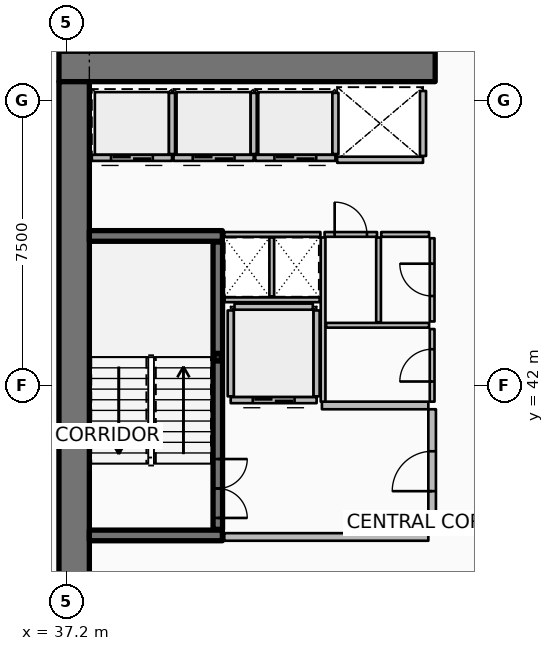
"""IFC4 building model, lengths in metres.
Left out: names, types, materials, properties, quantities, classifications, styles, units other than length and angle.
Written with IfcOpenShell. Run it as: python <this file> out.ifc"""

import sys

from ifc_helpers import new_model, si_unit, direction, frame, frame_2d, origin, origin_2d, place, context, subcontext, project, spatial, rectangle, hollow_rectangle, extrude, element, fill, save


model = new_model("IFC4")
c1 = context("Model", 3, precision=1e-05, world=origin(), true_north=direction((0.0, 1.0)))
c2 = subcontext(c1, "Body", "Model", "MODEL_VIEW")
j1 = project(units=[si_unit("LENGTHUNIT", "METRE"), si_unit("PLANEANGLEUNIT", "RADIAN")], contexts=[c1])
p1 = place(None, origin())
s1 = spatial("IfcSite", under=j1, at=p1, CompositionType="ELEMENT")
p2 = place(p1, origin())
s2 = spatial("IfcBuilding", under=s1, at=p2, CompositionType="ELEMENT")
p3 = place(p2, frame((0.0, 0.0, 146.55)))
s3 = spatial("IfcBuildingStorey", under=s2, at=p3, CompositionType="ELEMENT", Elevation=146.55)
p4 = place(p3, frame((37.0, 50.4, 0.0), z_axis=(0.0, 0.0, 1.0), x_axis=(1.0, 0.0, 0.0)))
e1 = element("IfcWall", 1, at=p4, inside=s3, PredefinedType="SHEAR", context=c2, shape_type="SweptSolid", body=[
    extrude(rectangle(XDim=9.9, YDim=0.8, at=frame_2d((4.95, 0.0))), origin(), (0.0, 0.0, 1.0), 3.75),
])
p5 = place(p3, frame((37.4, 34.0, 0.0), z_axis=(0.0, 0.0, 1.0), x_axis=(0.0, 1.0, 0.0)))
e2 = element("IfcWall", 2, at=p5, inside=s3, PredefinedType="SHEAR", context=c2, shape_type="SweptSolid", body=[
    extrude(rectangle(XDim=16.0, YDim=0.8, at=frame_2d((8.0, 0.0))), origin(), (0.0, 0.0, 1.0), 3.75),
])
for number, where, z_axis, x_axis in (
    (3, (37.8, 38.06, 0.0), (0.0, 0.0, 1.0), (1.0, 0.0, 0.0)),
    (4, (37.8, 45.94, 0.0), (0.0, 0.0, 1.0), (1.0, 0.0, 0.0)),
):
    element("IfcWall", number, at=place(p3, frame(where, z_axis=z_axis, x_axis=x_axis)), inside=s3, PredefinedType="SHEAR", context=c2, shape_type="SweptSolid", body=[
        extrude(rectangle(XDim=3.5, YDim=0.28, at=frame_2d((1.75, 0.0))), origin(), (0.0, 0.0, 1.0), 3.75),
    ])
p6 = place(p3, frame((41.18, 42.75, 0.0), z_axis=(0.0, 0.0, 1.0), x_axis=(1.0, 0.0, 0.0)))
e5 = element("IfcColumn", 5, at=p6, inside=s3, PredefinedType="COLUMN", context=c2, shape_type="SweptSolid", body=[
    extrude(hollow_rectangle(XDim=0.2, YDim=0.2, WallThickness=0.01, InnerFilletRadius=0.01, OuterFilletRadius=0.02, at=origin_2d()), origin(), (0.0, 0.0, 1.0), 1.67),
])
p7 = place(p3, frame((41.18, 38.22, 0.0), z_axis=(0.0, 0.0, 1.0), x_axis=(0.0, 1.0, 0.0)))
e6 = element("IfcWall", 6, at=p7, inside=s3, PredefinedType="SOLIDWALL", context=c2, shape_type="SweptSolid", body=[
    extrude(rectangle(XDim=7.56, YDim=0.25, at=frame_2d((3.78, 0.0))), origin(), (0.0, 0.0, 1.0), 3.5),
])
p8 = place(p7, frame((0.3, 0.0, 0.0)))
e7 = element("IfcOpeningElement", 7, at=p8, cuts=e6, PredefinedType="OPENING", context=c2, shape_type="SweptSolid", body=[
    extrude(rectangle(XDim=1.55, YDim=2.15, at=frame_2d((0.775, 1.075))), frame((0.0, 0.135, 0.0), z_axis=(0.0, -1.0, 0.0), x_axis=(1.0, 0.0, 0.0)), (0.0, 0.0, 1.0), 0.27),
])
p9 = place(p3, frame((39.975, 47.995, 0.0), z_axis=(0.0, 0.0, 1.0), x_axis=(-1.0, 0.0, 0.0)))
e8 = element("IfcWall", 8, at=p9, inside=s3, PredefinedType="PARTITIONING", context=c2, shape_type="SweptSolid", body=[
    extrude(rectangle(XDim=2.11, YDim=0.16, at=frame_2d((1.055, 0.0))), origin(), (0.0, 0.0, 1.0), 3.5),
])
p10 = place(p9, frame((0.505, 0.0, 0.0)))
e9 = element("IfcOpeningElement", 9, at=p10, cuts=e8, PredefinedType="OPENING", context=c2, shape_type="SweptSolid", body=[
    extrude(rectangle(XDim=1.1, YDim=2.1, at=frame_2d((0.55, 1.05))), frame((0.0, 0.09, 0.0), z_axis=(0.0, -1.0, 0.0), x_axis=(1.0, 0.0, 0.0)), (0.0, 0.0, 1.0), 0.18),
])
p11 = place(p3, frame((39.975, 48.095, 0.0), z_axis=(0.0, 0.0, 1.0), x_axis=(0.0, 1.0, 0.0)))
e10 = element("IfcWall", 10, at=p11, inside=s3, PredefinedType="PARTITIONING", context=c2, shape_type="SweptSolid", body=[
    extrude(rectangle(XDim=1.61, YDim=0.16, at=frame_2d((0.805, 0.0))), origin(), (0.0, 0.0, 1.0), 3.5),
])
p12 = place(p3, frame((42.125, 47.995, 0.0), z_axis=(0.0, 0.0, 1.0), x_axis=(-1.0, 0.0, 0.0)))
e11 = element("IfcWall", 11, at=p12, inside=s3, PredefinedType="PARTITIONING", context=c2, shape_type="SweptSolid", body=[
    extrude(rectangle(XDim=2.11, YDim=0.16, at=frame_2d((1.055, 0.0))), origin(), (0.0, 0.0, 1.0), 3.5),
])
p13 = place(p12, frame((0.505, 0.0, 0.0)))
e12 = element("IfcOpeningElement", 12, at=p13, cuts=e11, PredefinedType="OPENING", context=c2, shape_type="SweptSolid", body=[
    extrude(rectangle(XDim=1.1, YDim=2.1, at=frame_2d((0.55, 1.05))), frame((0.0, 0.09, 0.0), z_axis=(0.0, -1.0, 0.0), x_axis=(1.0, 0.0, 0.0)), (0.0, 0.0, 1.0), 0.18),
])
p14 = place(p3, frame((42.125, 48.095, 0.0), z_axis=(0.0, 0.0, 1.0), x_axis=(0.0, 1.0, 0.0)))
e13 = element("IfcWall", 13, at=p14, inside=s3, PredefinedType="PARTITIONING", context=c2, shape_type="SweptSolid", body=[
    extrude(rectangle(XDim=1.61, YDim=0.16, at=frame_2d((0.805, 0.0))), origin(), (0.0, 0.0, 1.0), 3.5),
])
p15 = place(p3, frame((44.275, 47.995, 0.0), z_axis=(0.0, 0.0, 1.0), x_axis=(-1.0, 0.0, 0.0)))
e14 = element("IfcWall", 14, at=p15, inside=s3, PredefinedType="PARTITIONING", context=c2, shape_type="SweptSolid", body=[
    extrude(rectangle(XDim=2.11, YDim=0.16, at=frame_2d((1.055, 0.0))), origin(), (0.0, 0.0, 1.0), 3.5),
])
p16 = place(p15, frame((0.505, 0.0, 0.0)))
e15 = element("IfcOpeningElement", 15, at=p16, cuts=e14, PredefinedType="OPENING", context=c2, shape_type="SweptSolid", body=[
    extrude(rectangle(XDim=1.1, YDim=2.1, at=frame_2d((0.55, 1.05))), frame((0.0, 0.09, 0.0), z_axis=(0.0, -1.0, 0.0), x_axis=(1.0, 0.0, 0.0)), (0.0, 0.0, 1.0), 0.18),
])
p17 = place(p3, frame((44.275, 48.095, 0.0), z_axis=(0.0, 0.0, 1.0), x_axis=(0.0, 1.0, 0.0)))
e16 = element("IfcWall", 16, at=p17, inside=s3, PredefinedType="PARTITIONING", context=c2, shape_type="SweptSolid", body=[
    extrude(rectangle(XDim=1.61, YDim=0.16, at=frame_2d((0.805, 0.0))), origin(), (0.0, 0.0, 1.0), 3.5),
])
p18 = place(p3, frame((46.58, 47.945, 0.0), z_axis=(0.0, 0.0, 1.0), x_axis=(-1.0, 0.0, 0.0)))
e17 = element("IfcWall", 17, at=p18, inside=s3, PredefinedType="PARTITIONING", context=c2, shape_type="SweptSolid", body=[
    extrude(rectangle(XDim=2.26, YDim=0.16, at=frame_2d((1.13, 0.0))), origin(), (0.0, 0.0, 1.0), 3.5),
])
p19 = place(p3, frame((46.58, 48.045, 0.0), z_axis=(0.0, 0.0, 1.0), x_axis=(0.0, 1.0, 0.0)))
e18 = element("IfcWall", 18, at=p19, inside=s3, PredefinedType="PARTITIONING", context=c2, shape_type="SweptSolid", body=[
    extrude(rectangle(XDim=1.71, YDim=0.16, at=frame_2d((0.855, 0.0))), origin(), (0.0, 0.0, 1.0), 3.5),
])
p20 = place(p3, frame((43.78, 41.62, 0.0), z_axis=(0.0, 0.0, 1.0), x_axis=(-1.0, 0.0, 0.0)))
e19 = element("IfcWall", 19, at=p20, inside=s3, PredefinedType="PARTITIONING", context=c2, shape_type="SweptSolid", body=[
    extrude(rectangle(XDim=2.26, YDim=0.16, at=frame_2d((1.13, 0.0))), origin(), (0.0, 0.0, 1.0), 3.5),
])
p21 = place(p20, frame((0.58, 0.0, 0.0)))
e20 = element("IfcOpeningElement", 20, at=p21, cuts=e19, PredefinedType="OPENING", context=c2, shape_type="SweptSolid", body=[
    extrude(rectangle(XDim=1.1, YDim=2.1, at=frame_2d((0.55, 1.05))), frame((0.0, 0.09, 0.0), z_axis=(0.0, -1.0, 0.0), x_axis=(1.0, 0.0, 0.0)), (0.0, 0.0, 1.0), 0.18),
])
for number, where, z_axis, x_axis in (
    (21, (43.78, 41.72, 0.0), (0.0, 0.0, 1.0), (0.0, 1.0, 0.0)),
    (22, (41.52, 41.72, 0.0), (0.0, 0.0, 1.0), (0.0, 1.0, 0.0)),
):
    element("IfcWall", number, at=place(p3, frame(where, z_axis=z_axis, x_axis=x_axis)), inside=s3, PredefinedType="PARTITIONING", context=c2, shape_type="SweptSolid", body=[
        extrude(rectangle(XDim=2.26, YDim=0.16, at=frame_2d((1.13, 0.0))), origin(), (0.0, 0.0, 1.0), 3.5),
    ])
p22 = place(p3, frame((41.62, 44.08, 0.0), z_axis=(0.0, 0.0, 1.0), x_axis=(1.0, 0.0, 0.0)))
e23 = element("IfcWall", 23, at=p22, inside=s3, PredefinedType="PARTITIONING", context=c2, shape_type="SweptSolid", body=[
    extrude(rectangle(XDim=2.06, YDim=0.16, at=frame_2d((1.03, 0.0))), origin(), (0.0, 0.0, 1.0), 3.5),
])
p23 = place(p3, frame((41.35, 38.02, 0.0), z_axis=(0.0, 0.0, 1.0), x_axis=(1.0, 0.0, 0.0)))
e24 = element("IfcWall", 24, at=p23, inside=s3, PredefinedType="PARTITIONING", context=c2, shape_type="SweptSolid", body=[
    extrude(rectangle(XDim=5.37, YDim=0.2, at=frame_2d((2.685, 0.0))), origin(), (0.0, 0.0, 1.0), 3.5),
])
p24 = place(p3, frame((43.92, 41.48, 0.0), z_axis=(0.0, 0.0, 1.0), x_axis=(1.0, 0.0, 0.0)))
e25 = element("IfcWall", 25, at=p24, inside=s3, PredefinedType="PARTITIONING", context=c2, shape_type="SweptSolid", body=[
    extrude(rectangle(XDim=2.8, YDim=0.2, at=frame_2d((1.4, 0.0))), origin(), (0.0, 0.0, 1.0), 3.5),
])
p25 = place(p3, frame((46.82, 38.12, 0.0), z_axis=(0.0, 0.0, 1.0), x_axis=(0.0, 1.0, 0.0)))
e26 = element("IfcWall", 26, at=p25, inside=s3, PredefinedType="PARTITIONING", context=c2, shape_type="SweptSolid", body=[
    extrude(rectangle(XDim=3.26, YDim=0.2, at=frame_2d((1.63, 0.0))), origin(), (0.0, 0.0, 1.0), 3.5),
])
p26 = place(p25, frame((1.105, 0.0, 0.0)))
e27 = element("IfcOpeningElement", 27, at=p26, cuts=e26, PredefinedType="OPENING", context=c2, shape_type="SweptSolid", body=[
    extrude(rectangle(XDim=1.05, YDim=2.1, at=frame_2d((0.525, 1.05))), frame((0.0, 0.11, 0.0), z_axis=(0.0, -1.0, 0.0), x_axis=(1.0, 0.0, 0.0)), (0.0, 0.0, 1.0), 0.22),
])
p27 = place(p3, frame((41.36, 44.26, 0.0), z_axis=(0.0, 0.0, 1.0), x_axis=(1.0, 0.0, 0.0)))
e28 = element("IfcWall", 28, at=p27, inside=s3, PredefinedType="PARTITIONING", context=c2, shape_type="SweptSolid", body=[
    extrude(rectangle(XDim=2.5, YDim=0.125, at=frame_2d((1.25, 0.0))), origin(), (0.0, 0.0, 1.0), 2.94),
])
p28 = place(p3, frame((42.6, 44.35, 0.0), z_axis=(0.0, 0.0, 1.0), x_axis=(0.0, 1.0, 0.0)))
e29 = element("IfcWall", 29, at=p28, inside=s3, PredefinedType="PARTITIONING", context=c2, shape_type="SweptSolid", body=[
    extrude(rectangle(XDim=1.55, YDim=0.125, at=frame_2d((0.775, 0.0))), origin(), (0.0, 0.0, 1.0), 2.94),
])
p29 = place(p3, frame((43.95, 41.58, 0.0), z_axis=(0.0, 0.0, 1.0), x_axis=(0.0, 1.0, 0.0)))
e30 = element("IfcWall", 30, at=p29, inside=s3, PredefinedType="PARTITIONING", context=c2, shape_type="SweptSolid", body=[
    extrude(rectangle(XDim=4.32, YDim=0.125, at=frame_2d((2.16, 0.0))), origin(), (0.0, 0.0, 1.0), 2.94),
])
p30 = place(p3, frame((44.03, 43.59, 0.0), z_axis=(0.0, 0.0, 1.0), x_axis=(1.0, 0.0, 0.0)))
e31 = element("IfcWall", 31, at=p30, inside=s3, PredefinedType="PARTITIONING", context=c2, shape_type="SweptSolid", body=[
    extrude(rectangle(XDim=2.71, YDim=0.125, at=frame_2d((1.355, 0.0))), origin(), (0.0, 0.0, 1.0), 2.94),
])
p31 = place(p3, frame((45.41, 43.67, 0.0), z_axis=(0.0, 0.0, 1.0), x_axis=(0.0, 1.0, 0.0)))
e32 = element("IfcWall", 32, at=p31, inside=s3, PredefinedType="PARTITIONING", context=c2, shape_type="SweptSolid", body=[
    extrude(rectangle(XDim=2.23, YDim=0.125, at=frame_2d((1.115, 0.0))), origin(), (0.0, 0.0, 1.0), 2.94),
])
p32 = place(p3, frame((46.82, 41.58, 0.0), z_axis=(0.0, 0.0, 1.0), x_axis=(0.0, 1.0, 0.0)))
e33 = element("IfcWall", 33, at=p32, inside=s3, PredefinedType="PARTITIONING", context=c2, shape_type="SweptSolid", body=[
    extrude(rectangle(XDim=1.91, YDim=0.125, at=frame_2d((0.955, 0.0))), origin(), (0.0, 0.0, 1.0), 2.94),
])
p33 = place(p32, frame((0.53, 0.0, 0.0)))
e34 = element("IfcOpeningElement", 34, at=p33, cuts=e33, PredefinedType="OPENING", context=c2, shape_type="SweptSolid", body=[
    extrude(rectangle(XDim=0.85, YDim=2.06, at=frame_2d((0.425, 1.03))), frame((0.0, 0.073, 0.0), z_axis=(0.0, -1.0, 0.0), x_axis=(1.0, 0.0, 0.0)), (0.0, 0.0, 1.0), 0.145),
])
p34 = place(p3, frame((46.82, 43.69, 0.0), z_axis=(0.0, 0.0, 1.0), x_axis=(0.0, 1.0, 0.0)))
e35 = element("IfcWall", 35, at=p34, inside=s3, PredefinedType="PARTITIONING", context=c2, shape_type="SweptSolid", body=[
    extrude(rectangle(XDim=2.19, YDim=0.125, at=frame_2d((1.095, 0.0))), origin(), (0.0, 0.0, 1.0), 2.94),
])
p35 = place(p34, frame((0.67, 0.0, 0.0)))
e36 = element("IfcOpeningElement", 36, at=p35, cuts=e35, PredefinedType="OPENING", context=c2, shape_type="SweptSolid", body=[
    extrude(rectangle(XDim=0.85, YDim=2.06, at=frame_2d((0.425, 1.03))), frame((0.0, 0.073, 0.0), z_axis=(0.0, -1.0, 0.0), x_axis=(1.0, 0.0, 0.0)), (0.0, 0.0, 1.0), 0.145),
])
p36 = place(p3, frame((41.35, 45.98, 0.0), z_axis=(0.0, 0.0, 1.0), x_axis=(1.0, 0.0, 0.0)))
e37 = element("IfcWall", 37, at=p36, inside=s3, PredefinedType="PARTITIONING", context=c2, shape_type="SweptSolid", body=[
    extrude(rectangle(XDim=2.53, YDim=0.125, at=frame_2d((1.265, 0.0))), origin(), (0.0, 0.0, 1.0), 2.94),
])
p37 = place(p3, frame((43.99, 45.98, 0.0), z_axis=(0.0, 0.0, 1.0), x_axis=(1.0, 0.0, 0.0)))
e38 = element("IfcWall", 38, at=p37, inside=s3, PredefinedType="PARTITIONING", context=c2, shape_type="SweptSolid", body=[
    extrude(rectangle(XDim=1.38, YDim=0.125, at=frame_2d((0.69, 0.0))), origin(), (0.0, 0.0, 1.0), 2.94),
])
p38 = place(p37, frame((0.265, 0.0, 0.0)))
e39 = element("IfcOpeningElement", 39, at=p38, cuts=e38, PredefinedType="OPENING", context=c2, shape_type="SweptSolid", body=[
    extrude(rectangle(XDim=0.85, YDim=2.06, at=frame_2d((0.425, 1.03))), frame((0.0, 0.073, 0.0), z_axis=(0.0, -1.0, 0.0), x_axis=(1.0, 0.0, 0.0)), (0.0, 0.0, 1.0), 0.145),
])
p39 = place(p3, frame((45.48, 45.98, 0.0), z_axis=(0.0, 0.0, 1.0), x_axis=(1.0, 0.0, 0.0)))
e40 = element("IfcWall", 40, at=p39, inside=s3, PredefinedType="PARTITIONING", context=c2, shape_type="SweptSolid", body=[
    extrude(rectangle(XDim=1.26, YDim=0.125, at=frame_2d((0.63, 0.0))), origin(), (0.0, 0.0, 1.0), 2.94),
])
p40 = place(p8, origin())
e41 = element("IfcDoor", 41, at=p40, inside=s3, OperationType="DOUBLE_DOOR_SINGLE_SWING", PredefinedType="DOOR", context=c2, shape_type="SweptSolid", body=[
    extrude(rectangle(XDim=1.55, YDim=2.15, at=frame_2d((0.775, 1.075))), frame((0.0, 0.025, 0.0), z_axis=(0.0, -1.0, 0.0), x_axis=(1.0, 0.0, 0.0)), (0.0, 0.0, 1.0), 0.05),
])
fill(e7, e41)
p41 = place(p10, origin())
e42 = element("IfcDoor", 42, at=p41, inside=s3, OperationType="DOUBLE_DOOR_SLIDING", PredefinedType="DOOR", context=c2, shape_type="SweptSolid", body=[
    extrude(rectangle(XDim=1.1, YDim=2.1, at=frame_2d((0.55, 1.05))), frame((0.0, 0.025, 0.0), z_axis=(0.0, -1.0, 0.0), x_axis=(1.0, 0.0, 0.0)), (0.0, 0.0, 1.0), 0.05),
])
fill(e9, e42)
p42 = place(p13, origin())
e43 = element("IfcDoor", 43, at=p42, inside=s3, OperationType="DOUBLE_DOOR_SLIDING", PredefinedType="DOOR", context=c2, shape_type="SweptSolid", body=[
    extrude(rectangle(XDim=1.1, YDim=2.1, at=frame_2d((0.55, 1.05))), frame((0.0, 0.025, 0.0), z_axis=(0.0, -1.0, 0.0), x_axis=(1.0, 0.0, 0.0)), (0.0, 0.0, 1.0), 0.05),
])
fill(e12, e43)
p43 = place(p16, origin())
e44 = element("IfcDoor", 44, at=p43, inside=s3, OperationType="DOUBLE_DOOR_SLIDING", PredefinedType="DOOR", context=c2, shape_type="SweptSolid", body=[
    extrude(rectangle(XDim=1.1, YDim=2.1, at=frame_2d((0.55, 1.05))), frame((0.0, 0.025, 0.0), z_axis=(0.0, -1.0, 0.0), x_axis=(1.0, 0.0, 0.0)), (0.0, 0.0, 1.0), 0.05),
])
fill(e15, e44)
p44 = place(p21, origin())
e45 = element("IfcDoor", 45, at=p44, inside=s3, OperationType="DOUBLE_DOOR_SLIDING", PredefinedType="DOOR", context=c2, shape_type="SweptSolid", body=[
    extrude(rectangle(XDim=1.1, YDim=2.1, at=frame_2d((0.55, 1.05))), frame((0.0, 0.025, 0.0), z_axis=(0.0, -1.0, 0.0), x_axis=(1.0, 0.0, 0.0)), (0.0, 0.0, 1.0), 0.05),
])
fill(e20, e45)
p45 = place(p26, origin())
e46 = element("IfcDoor", 46, at=p45, inside=s3, OperationType="SINGLE_SWING_LEFT", PredefinedType="DOOR", context=c2, shape_type="SweptSolid", body=[
    extrude(rectangle(XDim=1.05, YDim=2.1, at=frame_2d((0.525, 1.05))), frame((0.0, 0.025, 0.0), z_axis=(0.0, -1.0, 0.0), x_axis=(1.0, 0.0, 0.0)), (0.0, 0.0, 1.0), 0.05),
])
fill(e27, e46)
p46 = place(p33, origin())
e47 = element("IfcDoor", 47, at=p46, inside=s3, OperationType="SINGLE_SWING_LEFT", PredefinedType="DOOR", context=c2, shape_type="SweptSolid", body=[
    extrude(rectangle(XDim=0.85, YDim=2.06, at=frame_2d((0.425, 1.03))), frame((0.0, 0.025, 0.0), z_axis=(0.0, -1.0, 0.0), x_axis=(1.0, 0.0, 0.0)), (0.0, 0.0, 1.0), 0.05),
])
fill(e34, e47)
p47 = place(p35, origin())
e48 = element("IfcDoor", 48, at=p47, inside=s3, OperationType="SINGLE_SWING_RIGHT", PredefinedType="DOOR", context=c2, shape_type="SweptSolid", body=[
    extrude(rectangle(XDim=0.85, YDim=2.06, at=frame_2d((0.425, 1.03))), frame((0.0, 0.025, 0.0), z_axis=(0.0, -1.0, 0.0), x_axis=(1.0, 0.0, 0.0)), (0.0, 0.0, 1.0), 0.05),
])
fill(e36, e48)
p48 = place(p38, origin())
e49 = element("IfcDoor", 49, at=p48, inside=s3, OperationType="SINGLE_SWING_LEFT", PredefinedType="DOOR", context=c2, shape_type="SweptSolid", body=[
    extrude(rectangle(XDim=0.85, YDim=2.06, at=frame_2d((0.425, 1.03))), frame((0.0, 0.025, 0.0), z_axis=(0.0, -1.0, 0.0), x_axis=(1.0, 0.0, 0.0)), (0.0, 0.0, 1.0), 0.05),
])
fill(e39, e49)
save(model, sys.argv[1])
